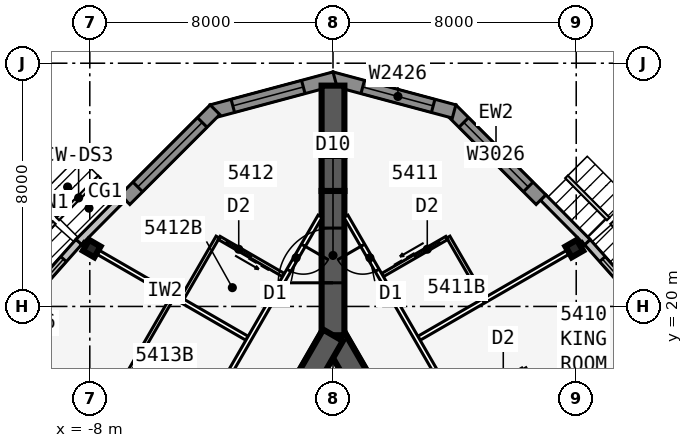
"""IFC4 building model, lengths in metres.
Left out: names, types, materials, properties, quantities, classifications, styles, units other than length and angle.
Written with IfcOpenShell. Run it as: python <this file> out.ifc"""

import sys

from ifc_helpers import new_model, si_unit, direction, frame, frame_2d, origin, origin_2d, place, context, subcontext, project, spatial, polyline, rectangle, i_section, outline, extrude, element, fill, save


model = new_model("IFC4")
c1 = context("Model", 3, precision=1e-05, world=origin(), true_north=direction((0.0, 1.0)))
c2 = subcontext(c1, "Body", "Model", "MODEL_VIEW")
j1 = project(units=[si_unit("LENGTHUNIT", "METRE"), si_unit("PLANEANGLEUNIT", "RADIAN")], contexts=[c1])
p1 = place(None, origin())
s1 = spatial("IfcSite", under=j1, at=p1, CompositionType="ELEMENT")
p2 = place(p1, origin())
s2 = spatial("IfcBuilding", under=s1, at=p2, CompositionType="ELEMENT")
p3 = place(p2, frame((0.0, 0.0, 204.5)))
s3 = spatial("IfcBuildingStorey", under=s2, at=p3, CompositionType="ELEMENT", Elevation=204.5)
p4 = place(p3, frame((16.5, -9.526, 0.0), z_axis=(0.0, 0.0, 1.0), x_axis=(-0.499999749417, 0.866025548458, 0.0)))
e1 = element("IfcWall", 1, at=p4, inside=s3, PredefinedType="SHEAR", context=c2, shape_type="SweptSolid", body=[
    extrude(rectangle(XDim=33.0, YDim=0.75, at=frame_2d((16.5, 0.0))), origin(), (0.0, 0.0, 1.0), 3.6),
])
p5 = place(p4, frame((14.15, 0.0, 0.0)))
e2 = element("IfcOpeningElement", 2, at=p5, cuts=e1, PredefinedType="OPENING", context=c2, shape_type="SweptSolid", body=[
    extrude(rectangle(XDim=1.8, YDim=2.13, at=frame_2d((0.9, 1.065))), frame((0.0, 0.385, 0.0), z_axis=(0.0, -1.0, 0.0), x_axis=(1.0, 0.0, 0.0)), (0.0, 0.0, 1.0), 0.77),
])
p6 = place(p4, frame((12.6, 0.0, 0.0)))
e3 = element("IfcOpeningElement", 3, at=p6, cuts=e1, PredefinedType="OPENING", context=c2, shape_type="SweptSolid", body=[
    extrude(rectangle(XDim=1.0, YDim=2.13, at=frame_2d((0.5, 1.065))), frame((0.0, 0.385, 0.0), z_axis=(0.0, -1.0, 0.0), x_axis=(1.0, 0.0, 0.0)), (0.0, 0.0, 1.0), 0.77),
])
p7 = place(p3, frame((0.0, 19.052, 0.0), z_axis=(0.0, 0.0, 1.0), x_axis=(-0.499999749417, -0.866025548458, 0.0)))
e4 = element("IfcWall", 4, at=p7, inside=s3, PredefinedType="SHEAR", context=c2, shape_type="SweptSolid", body=[
    extrude(rectangle(XDim=33.0, YDim=0.75, at=frame_2d((16.5, 0.0))), origin(), (0.0, 0.0, 1.0), 3.6),
])
p8 = place(p7, frame((14.15, 0.0, 0.0)))
e5 = element("IfcOpeningElement", 5, at=p8, cuts=e4, PredefinedType="OPENING", context=c2, shape_type="SweptSolid", body=[
    extrude(rectangle(XDim=1.8, YDim=2.13, at=frame_2d((0.9, 1.065))), frame((0.0, 0.385, 0.0), z_axis=(0.0, -1.0, 0.0), x_axis=(1.0, 0.0, 0.0)), (0.0, 0.0, 1.0), 0.77),
])
p9 = place(p7, frame((12.6, 0.0, 0.0)))
e6 = element("IfcOpeningElement", 6, at=p9, cuts=e4, PredefinedType="OPENING", context=c2, shape_type="SweptSolid", body=[
    extrude(rectangle(XDim=1.0, YDim=2.13, at=frame_2d((0.5, 1.065))), frame((0.0, 0.385, 0.0), z_axis=(0.0, -1.0, 0.0), x_axis=(1.0, 0.0, 0.0)), (0.0, 0.0, 1.0), 0.77),
])
p10 = place(p3, frame((0.0, 19.052, 0.0), z_axis=(0.0, 0.0, 1.0), x_axis=(0.0, 1.0, 0.0)))
e7 = element("IfcWall", 7, at=p10, inside=s3, PredefinedType="SHEAR", context=c2, shape_type="SweptSolid", body=[
    extrude(rectangle(XDim=4.746, YDim=0.75, at=frame_2d((2.373, 0.0))), origin(), (0.0, 0.0, 1.0), 3.6),
])
p11 = place(p10, frame((1.725, 0.0, 0.0)))
e8 = element("IfcOpeningElement", 8, at=p11, cuts=e7, PredefinedType="OPENING", context=c2, shape_type="SweptSolid", body=[
    extrude(rectangle(XDim=1.8, YDim=2.13, at=frame_2d((0.9, 1.065))), frame((0.0, 0.385, 0.0), z_axis=(0.0, -1.0, 0.0), x_axis=(1.0, 0.0, 0.0)), (0.0, 0.0, 1.0), 0.77),
])
p12 = place(p3, frame((0.0, 23.799, 0.0), z_axis=(0.0, 0.0, 1.0), x_axis=(0.0, 1.0, 0.0)))
e9 = element("IfcWall", 9, at=p12, inside=s3, PredefinedType="SHEAR", context=c2, shape_type="SweptSolid", body=[
    extrude(rectangle(XDim=1.155, YDim=0.75, at=frame_2d((0.577, 0.0))), origin(), (0.0, 0.0, 1.0), 3.6),
])
p13 = place(p3, frame((0.0, 24.953, 0.0), z_axis=(0.0, 0.0, 1.0), x_axis=(0.0, 1.0, 0.0)))
e10 = element("IfcWall", 10, at=p13, inside=s3, PredefinedType="SHEAR", context=c2, shape_type="SweptSolid", body=[
    extrude(rectangle(XDim=2.309, YDim=0.75, at=frame_2d((1.155, 0.0))), origin(), (0.0, 0.0, 1.0), 3.6),
])
for number, where, z_axis, x_axis in (
    (11, (7.937, 21.903, 0.0), (0.0, 0.0, 1.0), (-0.5, 0.866, 0.0)),
    (12, (-7.937, 21.903, 0.0), (0.0, 0.0, 1.0), (-0.5, -0.866, 0.0)),
):
    element("IfcColumn", number, at=place(p3, frame(where, z_axis=z_axis, x_axis=x_axis)), inside=s3, PredefinedType="COLUMN", context=c2, shape_type="SweptSolid", body=[
        extrude(i_section(OverallWidth=0.411, OverallDepth=0.434, WebThickness=0.036, FlangeThickness=0.057, at=origin_2d()), origin(), (0.0, 0.0, 1.0), 3.6),
    ])
p14 = place(p3, frame((11.754, 18.304, 0.0), z_axis=(0.0, 0.0, 1.0), x_axis=(-0.664348996191, 0.747422511876, 0.0)))
e13 = element("IfcWall", 13, at=p14, inside=s3, PredefinedType="STANDARD", context=c2, shape_type="SweptSolid", body=[
    extrude(rectangle(XDim=5.105, YDim=0.25, at=frame_2d((2.552, 0.0))), origin(), (0.0, 0.0, 1.0), 3.435),
])
p15 = place(p14, frame((0.752, 0.0, 0.45)))
e14 = element("IfcOpeningElement", 14, at=p15, cuts=e13, PredefinedType="OPENING", context=c2, shape_type="SweptSolid", body=[
    extrude(rectangle(XDim=3.6, YDim=2.6, at=frame_2d((1.8, 1.3))), frame((0.0, 0.135, 0.0), z_axis=(0.0, -1.0, 0.0), x_axis=(1.0, 0.0, 0.0)), (0.0, 0.0, 1.0), 0.27),
])
p16 = place(p3, frame((8.368, 22.115, 0.0), z_axis=(0.0, 0.0, 1.0), x_axis=(-0.704149946111, 0.710051303352, 0.0)))
e15 = element("IfcWall", 15, at=p16, inside=s3, PredefinedType="STANDARD", context=c2, shape_type="SweptSolid", body=[
    extrude(rectangle(XDim=2.069, YDim=0.25, at=frame_2d((1.034, 0.0))), origin(), (0.0, 0.0, 1.0), 3.435),
])
p17 = place(p3, frame((6.841, 23.512, 0.0), z_axis=(0.0, 0.0, 1.0), x_axis=(-0.707106781187, 0.707106781187, 0.0)))
e16 = element("IfcWall", 16, at=p17, inside=s3, PredefinedType="SOLIDWALL", context=c2, shape_type="SweptSolid", body=[
    extrude(rectangle(XDim=4.184, YDim=0.45, at=frame_2d((2.092, 0.0))), origin(), (0.0, 0.0, 1.0), 3.435),
])
p18 = place(p17, frame((0.592, 0.0, 0.45)))
e17 = element("IfcOpeningElement", 17, at=p18, cuts=e16, PredefinedType="OPENING", context=c2, shape_type="SweptSolid", body=[
    extrude(rectangle(XDim=3.0, YDim=2.6, at=frame_2d((1.5, 1.3))), frame((0.0, 0.235, 0.0), z_axis=(0.0, -1.0, 0.0), x_axis=(1.0, 0.0, 0.0)), (0.0, 0.0, 1.0), 0.47),
])
p19 = place(p3, frame((3.983, 26.413, 0.0), z_axis=(0.0, 0.0, 1.0), x_axis=(-0.965920442324, 0.258839137498, 0.0)))
e18 = element("IfcWall", 18, at=p19, inside=s3, PredefinedType="SOLIDWALL", context=c2, shape_type="SweptSolid", body=[
    extrude(outline(polyline([(4.184, 0.225), (4.124, 0.225), (3.706, 0.113), (3.676, 0.225), (0.0, 0.225), (0.0, -0.225), (4.184, -0.225), (4.184, 0.225)])), origin(), (0.0, 0.0, 1.0), 3.435),
])
p20 = place(p19, frame((0.713, 0.0, 0.45)))
e19 = element("IfcOpeningElement", 19, at=p20, cuts=e18, PredefinedType="OPENING", context=c2, shape_type="SweptSolid", body=[
    extrude(rectangle(XDim=2.4, YDim=2.6, at=frame_2d((1.2, 1.3))), frame((0.0, 0.235, 0.0), z_axis=(0.0, -1.0, 0.0), x_axis=(1.0, 0.0, 0.0)), (0.0, 0.0, 1.0), 0.47),
])
p21 = place(p3, frame((0.058, 27.496, 0.0), z_axis=(0.0, 0.0, 1.0), x_axis=(-0.965920442324, -0.258839137498, 0.0)))
e20 = element("IfcWall", 20, at=p21, inside=s3, PredefinedType="SOLIDWALL", context=c2, shape_type="SweptSolid", body=[
    extrude(outline(polyline([(4.184, 0.225), (0.509, 0.225), (0.479, 0.113), (0.06, 0.225), (0.0, 0.225), (0.0, -0.225), (4.184, -0.225), (4.184, 0.225)])), origin(), (0.0, 0.0, 1.0), 3.435),
])
p22 = place(p21, frame((1.071, 0.0, 0.45)))
e21 = element("IfcOpeningElement", 21, at=p22, cuts=e20, PredefinedType="OPENING", context=c2, shape_type="SweptSolid", body=[
    extrude(rectangle(XDim=2.4, YDim=2.6, at=frame_2d((1.2, 1.3))), frame((0.0, 0.235, 0.0), z_axis=(0.0, -1.0, 0.0), x_axis=(1.0, 0.0, 0.0)), (0.0, 0.0, 1.0), 0.47),
])
p23 = place(p3, frame((-3.882, 26.471, 0.0), z_axis=(0.0, 0.0, 1.0), x_axis=(-0.707106781187, -0.707106781187, 0.0)))
e22 = element("IfcWall", 22, at=p23, inside=s3, PredefinedType="SOLIDWALL", context=c2, shape_type="SweptSolid", body=[
    extrude(rectangle(XDim=4.184, YDim=0.45, at=frame_2d((2.092, 0.0))), origin(), (0.0, 0.0, 1.0), 3.435),
])
p24 = place(p23, frame((0.592, 0.0, 0.45)))
e23 = element("IfcOpeningElement", 23, at=p24, cuts=e22, PredefinedType="OPENING", context=c2, shape_type="SweptSolid", body=[
    extrude(rectangle(XDim=3.0, YDim=2.6, at=frame_2d((1.5, 1.3))), frame((0.0, 0.235, 0.0), z_axis=(0.0, -1.0, 0.0), x_axis=(1.0, 0.0, 0.0)), (0.0, 0.0, 1.0), 0.47),
])
p25 = place(p3, frame((-6.911, 23.583, 0.0), z_axis=(0.0, 0.0, 1.0), x_axis=(-0.704149946111, -0.710051303352, 0.0)))
e24 = element("IfcWall", 24, at=p25, inside=s3, PredefinedType="STANDARD", context=c2, shape_type="SweptSolid", body=[
    extrude(rectangle(XDim=2.069, YDim=0.25, at=frame_2d((1.034, 0.0))), origin(), (0.0, 0.0, 1.0), 3.435),
])
p26 = place(p3, frame((-8.363, 22.12, 0.0), z_axis=(0.0, 0.0, 1.0), x_axis=(-0.664348996191, -0.747422511876, 0.0)))
e25 = element("IfcWall", 25, at=p26, inside=s3, PredefinedType="STANDARD", context=c2, shape_type="SweptSolid", body=[
    extrude(rectangle(XDim=5.105, YDim=0.25, at=frame_2d((2.552, 0.0))), origin(), (0.0, 0.0, 1.0), 3.435),
])
p27 = place(p26, frame((0.752, 0.0, 0.45)))
e26 = element("IfcOpeningElement", 26, at=p27, cuts=e25, PredefinedType="OPENING", context=c2, shape_type="SweptSolid", body=[
    extrude(rectangle(XDim=3.6, YDim=2.6, at=frame_2d((1.8, 1.3))), frame((0.0, 0.135, 0.0), z_axis=(0.0, -1.0, 0.0), x_axis=(1.0, 0.0, 0.0)), (0.0, 0.0, 1.0), 0.27),
])
p28 = place(p3, frame((20.102, -11.115, 0.0), z_axis=(0.0, 0.0, 1.0), x_axis=(-0.500000265775, 0.866025250339, 0.0)))
e27 = element("IfcWall", 27, at=p28, inside=s3, PredefinedType="PARTITIONING", context=c2, shape_type="SweptSolid", body=[
    extrude(rectangle(XDim=39.354, YDim=0.15, at=frame_2d((19.677, 0.0))), origin(), (0.0, 0.0, 1.0), 3.435),
])
p29 = place(p28, frame((1.665, 0.0, 0.0)))
e28 = element("IfcOpeningElement", 28, at=p29, cuts=e27, PredefinedType="OPENING", context=c2, shape_type="SweptSolid", body=[
    extrude(rectangle(XDim=0.95, YDim=2.13, at=frame_2d((0.475, 1.065))), frame((0.0, 0.085, 0.0), z_axis=(0.0, -1.0, 0.0), x_axis=(1.0, 0.0, 0.0)), (0.0, 0.0, 1.0), 0.17),
])
p30 = place(p28, frame((12.902, 0.0, 0.0)))
e29 = element("IfcOpeningElement", 29, at=p30, cuts=e27, PredefinedType="OPENING", context=c2, shape_type="SweptSolid", body=[
    extrude(rectangle(XDim=0.95, YDim=2.13, at=frame_2d((0.475, 1.065))), frame((0.0, 0.085, 0.0), z_axis=(0.0, -1.0, 0.0), x_axis=(1.0, 0.0, 0.0)), (0.0, 0.0, 1.0), 0.17),
])
p31 = place(p28, frame((17.302, 0.0, 0.0)))
e30 = element("IfcOpeningElement", 30, at=p31, cuts=e27, PredefinedType="OPENING", context=c2, shape_type="SweptSolid", body=[
    extrude(rectangle(XDim=0.95, YDim=2.13, at=frame_2d((0.475, 1.065))), frame((0.0, 0.085, 0.0), z_axis=(0.0, -1.0, 0.0), x_axis=(1.0, 0.0, 0.0)), (0.0, 0.0, 1.0), 0.17),
])
p32 = place(p28, frame((22.902, 0.0, 0.0)))
e31 = element("IfcOpeningElement", 31, at=p32, cuts=e27, PredefinedType="OPENING", context=c2, shape_type="SweptSolid", body=[
    extrude(rectangle(XDim=0.95, YDim=2.13, at=frame_2d((0.475, 1.065))), frame((0.0, 0.085, 0.0), z_axis=(0.0, -1.0, 0.0), x_axis=(1.0, 0.0, 0.0)), (0.0, 0.0, 1.0), 0.17),
])
p33 = place(p28, frame((32.302, 0.0, 0.0)))
e32 = element("IfcOpeningElement", 32, at=p33, cuts=e27, PredefinedType="OPENING", context=c2, shape_type="SweptSolid", body=[
    extrude(rectangle(XDim=0.95, YDim=2.13, at=frame_2d((0.475, 1.065))), frame((0.0, 0.085, 0.0), z_axis=(0.0, -1.0, 0.0), x_axis=(1.0, 0.0, 0.0)), (0.0, 0.0, 1.0), 0.17),
])
p34 = place(p28, frame((37.302, 0.0, 0.0)))
e33 = element("IfcOpeningElement", 33, at=p34, cuts=e27, PredefinedType="OPENING", context=c2, shape_type="SweptSolid", body=[
    extrude(rectangle(XDim=0.95, YDim=2.13, at=frame_2d((0.475, 1.065))), frame((0.0, 0.085, 0.0), z_axis=(0.0, -1.0, 0.0), x_axis=(1.0, 0.0, 0.0)), (0.0, 0.0, 1.0), 0.17),
])
p35 = place(p3, frame((5.329, 14.623, 0.0), z_axis=(0.0, 0.0, 1.0), x_axis=(0.866017877653, 0.500013035415, 0.0)))
e34 = element("IfcWall", 34, at=p35, inside=s3, PredefinedType="PARTITIONING", context=c2, shape_type="SweptSolid", body=[
    extrude(rectangle(XDim=7.273, YDim=0.15, at=frame_2d((3.636, 0.0))), origin(), (0.0, 0.0, 1.0), 2.589),
])
p36 = place(p3, frame((2.829, 18.954, 0.0), z_axis=(0.0, 0.0, 1.0), x_axis=(0.866026604282, 0.499997920671, 0.0)))
e35 = element("IfcWall", 35, at=p36, inside=s3, PredefinedType="PARTITIONING", context=c2, shape_type="SweptSolid", body=[
    extrude(rectangle(XDim=6.24, YDim=0.15, at=frame_2d((3.12, 0.0))), origin(), (0.0, 0.0, 1.0), 2.589),
])
p37 = place(p3, frame((7.493, 15.873, 0.0), z_axis=(0.0, 0.0, 1.0), x_axis=(-0.499957262057, 0.866050077142, 0.0)))
e36 = element("IfcWall", 36, at=p37, inside=s3, PredefinedType="PLUMBINGWALL", context=c2, shape_type="SweptSolid", body=[
    extrude(rectangle(XDim=2.4, YDim=0.12, at=frame_2d((1.2, 0.0))), origin(), (0.0, 0.0, 1.0), 3.435),
])
p38 = place(p3, frame((4.128, 16.702, 0.0), z_axis=(0.0, 0.0, 1.0), x_axis=(0.866048967903, 0.499959183527, 0.0)))
e37 = element("IfcWall", 37, at=p38, inside=s3, PredefinedType="PLUMBINGWALL", context=c2, shape_type="SweptSolid", body=[
    extrude(rectangle(XDim=2.44, YDim=0.12, at=frame_2d((1.22, 0.0))), origin(), (0.0, 0.0, 1.0), 3.435),
])
p39 = place(p38, frame((1.25, 0.0, 0.0)))
e38 = element("IfcOpeningElement", 38, at=p39, cuts=e37, PredefinedType="OPENING", context=c2, shape_type="SweptSolid", body=[
    extrude(rectangle(XDim=0.9, YDim=2.13, at=frame_2d((0.45, 1.065))), frame((0.0, 0.07, 0.0), z_axis=(0.0, -1.0, 0.0), x_axis=(1.0, 0.0, 0.0)), (0.0, 0.0, 1.0), 0.14),
])
p40 = place(p3, frame((4.993, 20.204, 0.0), z_axis=(0.0, 0.0, 1.0), x_axis=(-0.500001309137, 0.866024647952, 0.0)))
e39 = element("IfcWall", 39, at=p40, inside=s3, PredefinedType="PLUMBINGWALL", context=c2, shape_type="SweptSolid", body=[
    extrude(rectangle(XDim=2.4, YDim=0.12, at=frame_2d((1.2, 0.0))), origin(), (0.0, 0.0, 1.0), 3.435),
])
p41 = place(p3, frame((1.628, 21.032, 0.0), z_axis=(0.0, 0.0, 1.0), x_axis=(0.866048967903, 0.499959183527, 0.0)))
e40 = element("IfcWall", 40, at=p41, inside=s3, PredefinedType="PLUMBINGWALL", context=c2, shape_type="SweptSolid", body=[
    extrude(rectangle(XDim=2.44, YDim=0.12, at=frame_2d((1.22, 0.0))), origin(), (0.0, 0.0, 1.0), 3.435),
])
p42 = place(p41, frame((1.25, 0.0, 0.0)))
e41 = element("IfcOpeningElement", 41, at=p42, cuts=e40, PredefinedType="OPENING", context=c2, shape_type="SweptSolid", body=[
    extrude(rectangle(XDim=0.9, YDim=2.13, at=frame_2d((0.45, 1.065))), frame((0.0, 0.07, 0.0), z_axis=(0.0, -1.0, 0.0), x_axis=(1.0, 0.0, 0.0)), (0.0, 0.0, 1.0), 0.14),
])
p43 = place(p3, frame((-0.425, 22.966, 0.0), z_axis=(0.0, 0.0, 1.0), x_axis=(-0.500000265775, -0.866025250339, 0.0)))
e42 = element("IfcWall", 42, at=p43, inside=s3, PredefinedType="PARTITIONING", context=c2, shape_type="SweptSolid", body=[
    extrude(rectangle(XDim=39.354, YDim=0.15, at=frame_2d((19.677, 0.0))), origin(), (0.0, 0.0, 1.0), 3.435),
])
p44 = place(p43, frame((1.102, 0.0, 0.0)))
e43 = element("IfcOpeningElement", 43, at=p44, cuts=e42, PredefinedType="OPENING", context=c2, shape_type="SweptSolid", body=[
    extrude(rectangle(XDim=0.95, YDim=2.13, at=frame_2d((0.475, 1.065))), frame((0.0, 0.085, 0.0), z_axis=(0.0, -1.0, 0.0), x_axis=(1.0, 0.0, 0.0)), (0.0, 0.0, 1.0), 0.17),
])
p45 = place(p43, frame((7.902, 0.0, 0.0)))
e44 = element("IfcOpeningElement", 44, at=p45, cuts=e42, PredefinedType="OPENING", context=c2, shape_type="SweptSolid", body=[
    extrude(rectangle(XDim=0.95, YDim=2.13, at=frame_2d((0.475, 1.065))), frame((0.0, 0.085, 0.0), z_axis=(0.0, -1.0, 0.0), x_axis=(1.0, 0.0, 0.0)), (0.0, 0.0, 1.0), 0.17),
])
p46 = place(p43, frame((17.302, 0.0, 0.0)))
e45 = element("IfcOpeningElement", 45, at=p46, cuts=e42, PredefinedType="OPENING", context=c2, shape_type="SweptSolid", body=[
    extrude(rectangle(XDim=0.95, YDim=2.13, at=frame_2d((0.475, 1.065))), frame((0.0, 0.085, 0.0), z_axis=(0.0, -1.0, 0.0), x_axis=(1.0, 0.0, 0.0)), (0.0, 0.0, 1.0), 0.17),
])
p47 = place(p43, frame((26.702, 0.0, 0.0)))
e46 = element("IfcOpeningElement", 46, at=p47, cuts=e42, PredefinedType="OPENING", context=c2, shape_type="SweptSolid", body=[
    extrude(rectangle(XDim=0.95, YDim=2.13, at=frame_2d((0.475, 1.065))), frame((0.0, 0.085, 0.0), z_axis=(0.0, -1.0, 0.0), x_axis=(1.0, 0.0, 0.0)), (0.0, 0.0, 1.0), 0.17),
])
p48 = place(p43, frame((37.302, 0.0, 0.0)))
e47 = element("IfcOpeningElement", 47, at=p48, cuts=e42, PredefinedType="OPENING", context=c2, shape_type="SweptSolid", body=[
    extrude(rectangle(XDim=0.95, YDim=2.13, at=frame_2d((0.475, 1.065))), frame((0.0, 0.085, 0.0), z_axis=(0.0, -1.0, 0.0), x_axis=(1.0, 0.0, 0.0)), (0.0, 0.0, 1.0), 0.17),
])
p49 = place(p3, frame((-2.829, 18.954, 0.0), z_axis=(0.0, 0.0, 1.0), x_axis=(-0.866026604282, 0.499997920671, 0.0)))
e48 = element("IfcWall", 48, at=p49, inside=s3, PredefinedType="PARTITIONING", context=c2, shape_type="SweptSolid", body=[
    extrude(rectangle(XDim=6.24, YDim=0.15, at=frame_2d((3.12, 0.0))), origin(), (0.0, 0.0, 1.0), 2.589),
])
p50 = place(p3, frame((-3.793, 22.282, 0.0), z_axis=(0.0, 0.0, 1.0), x_axis=(-0.500001309137, -0.866024647952, 0.0)))
e49 = element("IfcWall", 49, at=p50, inside=s3, PredefinedType="PLUMBINGWALL", context=c2, shape_type="SweptSolid", body=[
    extrude(rectangle(XDim=2.4, YDim=0.12, at=frame_2d((1.2, 0.0))), origin(), (0.0, 0.0, 1.0), 3.435),
])
p51 = place(p3, frame((-1.628, 21.032, 0.0), z_axis=(0.0, 0.0, 1.0), x_axis=(-0.866048967903, 0.499959183527, 0.0)))
e50 = element("IfcWall", 50, at=p51, inside=s3, PredefinedType="PLUMBINGWALL", context=c2, shape_type="SweptSolid", body=[
    extrude(rectangle(XDim=2.44, YDim=0.12, at=frame_2d((1.22, 0.0))), origin(), (0.0, 0.0, 1.0), 3.435),
])
p52 = place(p51, frame((1.25, 0.0, 0.0)))
e51 = element("IfcOpeningElement", 51, at=p52, cuts=e50, PredefinedType="OPENING", context=c2, shape_type="SweptSolid", body=[
    extrude(rectangle(XDim=0.9, YDim=2.13, at=frame_2d((0.45, 1.065))), frame((0.0, 0.07, 0.0), z_axis=(0.0, -1.0, 0.0), x_axis=(1.0, 0.0, 0.0)), (0.0, 0.0, 1.0), 0.14),
])
p53 = place(p3, frame((-5.253, 20.354, 0.0), z_axis=(0.0, 0.0, 1.0), x_axis=(-0.499990139034, -0.866031096941, 0.0)))
e52 = element("IfcWall", 52, at=p53, inside=s3, PredefinedType="PLUMBINGWALL", context=c2, shape_type="SweptSolid", body=[
    extrude(rectangle(XDim=3.0, YDim=0.12, at=frame_2d((1.5, 0.0))), origin(), (0.0, 0.0, 1.0), 3.435),
])
p54 = place(p15, origin())
e53 = element("IfcWindow", 53, at=p54, inside=s3, PartitioningType="SINGLE_PANEL", PredefinedType="WINDOW", context=c2, shape_type="SweptSolid", body=[
    extrude(rectangle(XDim=3.6, YDim=2.6, at=frame_2d((1.8, 1.3))), frame((0.0, 0.03, 0.0), z_axis=(0.0, -1.0, 0.0), x_axis=(1.0, 0.0, 0.0)), (0.0, 0.0, 1.0), 0.06),
])
fill(e14, e53)
p55 = place(p18, origin())
e54 = element("IfcWindow", 54, at=p55, inside=s3, PartitioningType="SINGLE_PANEL", PredefinedType="WINDOW", context=c2, shape_type="SweptSolid", body=[
    extrude(rectangle(XDim=3.0, YDim=2.6, at=frame_2d((1.5, 1.3))), frame((0.0, 0.03, 0.0), z_axis=(0.0, -1.0, 0.0), x_axis=(1.0, 0.0, 0.0)), (0.0, 0.0, 1.0), 0.06),
])
fill(e17, e54)
p56 = place(p20, origin())
e55 = element("IfcWindow", 55, at=p56, inside=s3, PartitioningType="SINGLE_PANEL", PredefinedType="WINDOW", context=c2, shape_type="SweptSolid", body=[
    extrude(rectangle(XDim=2.4, YDim=2.6, at=frame_2d((1.2, 1.3))), frame((0.0, 0.03, 0.0), z_axis=(0.0, -1.0, 0.0), x_axis=(1.0, 0.0, 0.0)), (0.0, 0.0, 1.0), 0.06),
])
fill(e19, e55)
p57 = place(p22, origin())
e56 = element("IfcWindow", 56, at=p57, inside=s3, PartitioningType="SINGLE_PANEL", PredefinedType="WINDOW", context=c2, shape_type="SweptSolid", body=[
    extrude(rectangle(XDim=2.4, YDim=2.6, at=frame_2d((1.2, 1.3))), frame((0.0, 0.03, 0.0), z_axis=(0.0, -1.0, 0.0), x_axis=(1.0, 0.0, 0.0)), (0.0, 0.0, 1.0), 0.06),
])
fill(e21, e56)
p58 = place(p24, origin())
e57 = element("IfcWindow", 57, at=p58, inside=s3, PartitioningType="SINGLE_PANEL", PredefinedType="WINDOW", context=c2, shape_type="SweptSolid", body=[
    extrude(rectangle(XDim=3.0, YDim=2.6, at=frame_2d((1.5, 1.3))), frame((0.0, 0.03, 0.0), z_axis=(0.0, -1.0, 0.0), x_axis=(1.0, 0.0, 0.0)), (0.0, 0.0, 1.0), 0.06),
])
fill(e23, e57)
p59 = place(p27, origin())
e58 = element("IfcWindow", 58, at=p59, inside=s3, PartitioningType="SINGLE_PANEL", PredefinedType="WINDOW", context=c2, shape_type="SweptSolid", body=[
    extrude(rectangle(XDim=3.6, YDim=2.6, at=frame_2d((1.8, 1.3))), frame((0.0, 0.03, 0.0), z_axis=(0.0, -1.0, 0.0), x_axis=(1.0, 0.0, 0.0)), (0.0, 0.0, 1.0), 0.06),
])
fill(e26, e58)
p60 = place(p42, origin())
e59 = element("IfcDoor", 59, at=p60, inside=s3, OperationType="SLIDING_TO_LEFT", PredefinedType="DOOR", context=c2, shape_type="SweptSolid", body=[
    extrude(rectangle(XDim=0.9, YDim=2.13, at=frame_2d((0.45, 1.065))), frame((0.0, 0.025, 0.0), z_axis=(0.0, -1.0, 0.0), x_axis=(1.0, 0.0, 0.0)), (0.0, 0.0, 1.0), 0.05),
])
fill(e41, e59)
p61 = place(p34, origin())
e60 = element("IfcDoor", 60, at=p61, inside=s3, OperationType="SINGLE_SWING_RIGHT", PredefinedType="DOOR", context=c2, shape_type="SweptSolid", body=[
    extrude(rectangle(XDim=0.95, YDim=2.13, at=frame_2d((0.475, 1.065))), frame((0.0, 0.025, 0.0), z_axis=(0.0, -1.0, 0.0), x_axis=(1.0, 0.0, 0.0)), (0.0, 0.0, 1.0), 0.05),
])
fill(e33, e60)
p62 = place(p52, origin())
e61 = element("IfcDoor", 61, at=p62, inside=s3, OperationType="SLIDING_TO_LEFT", PredefinedType="DOOR", context=c2, shape_type="SweptSolid", body=[
    extrude(rectangle(XDim=0.9, YDim=2.13, at=frame_2d((0.45, 1.065))), frame((0.0, 0.025, 0.0), z_axis=(0.0, -1.0, 0.0), x_axis=(1.0, 0.0, 0.0)), (0.0, 0.0, 1.0), 0.05),
])
fill(e51, e61)
p63 = place(p44, origin())
e62 = element("IfcDoor", 62, at=p63, inside=s3, OperationType="SINGLE_SWING_LEFT", PredefinedType="DOOR", context=c2, shape_type="SweptSolid", body=[
    extrude(rectangle(XDim=0.95, YDim=2.13, at=frame_2d((0.475, 1.065))), frame((0.0, 0.025, 0.0), z_axis=(0.0, -1.0, 0.0), x_axis=(1.0, 0.0, 0.0)), (0.0, 0.0, 1.0), 0.05),
])
fill(e43, e62)
p64 = place(p11, origin())
e63 = element("IfcDoor", 63, at=p64, inside=s3, OperationType="DOUBLE_DOOR_DOUBLE_SWING", PredefinedType="DOOR", context=c2, shape_type="SweptSolid", body=[
    extrude(rectangle(XDim=1.8, YDim=2.13, at=frame_2d((0.9, 1.065))), frame((0.0, 0.025, 0.0), z_axis=(0.0, -1.0, 0.0), x_axis=(1.0, 0.0, 0.0)), (0.0, 0.0, 1.0), 0.05),
])
fill(e8, e63)
save(model, sys.argv[1])
